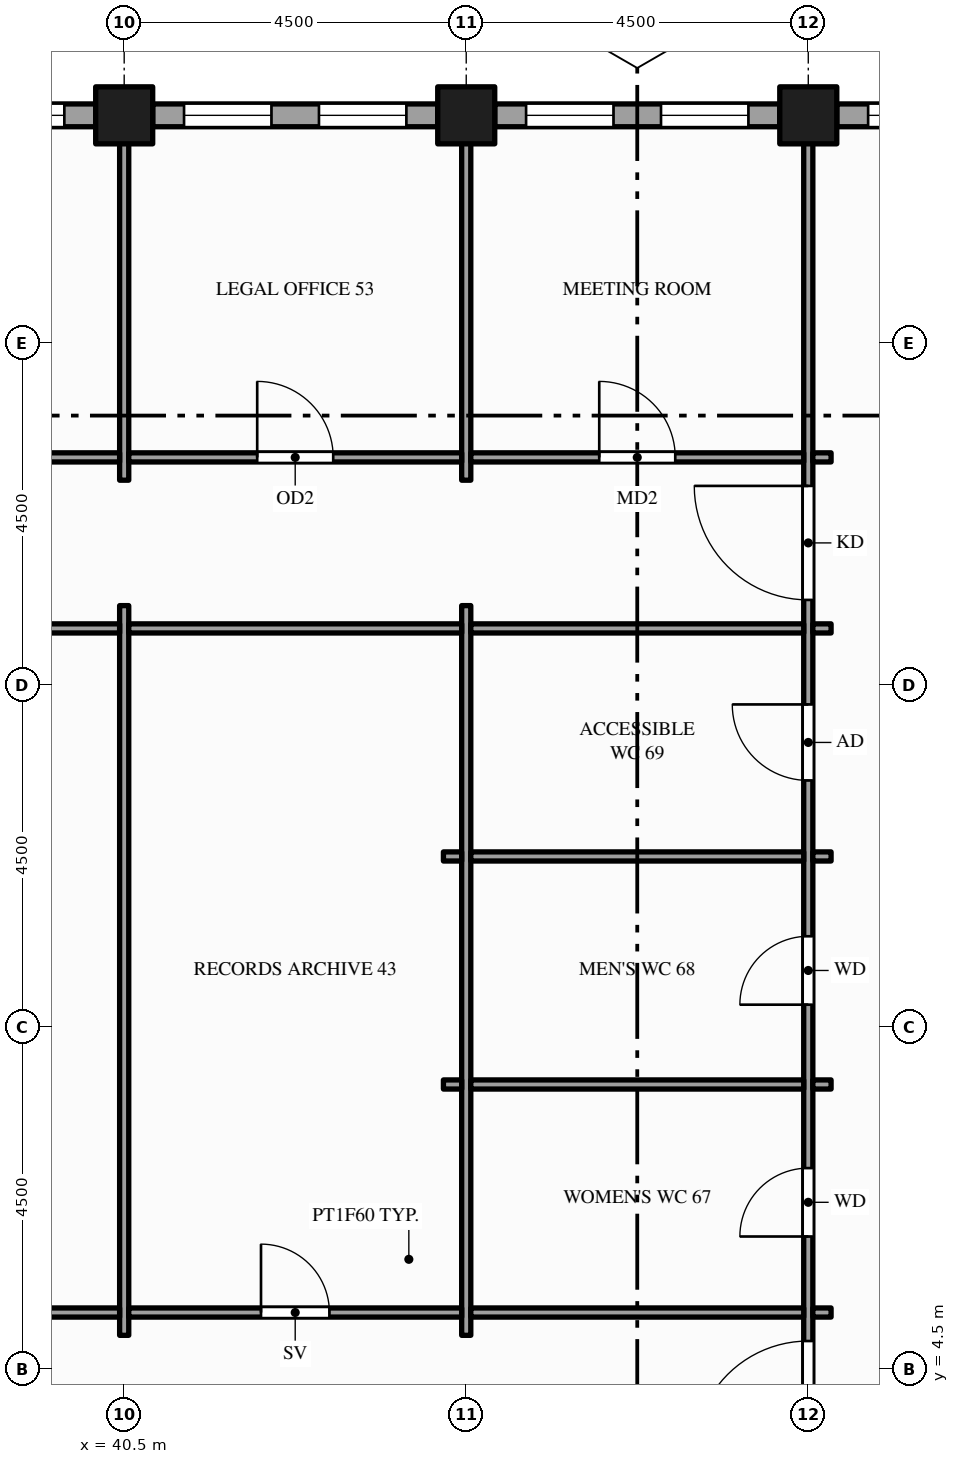
"""IFC4 building model, lengths in metres.
Left out: names, types, materials, properties, quantities, classifications, styles, units other than length and angle.
Written with IfcOpenShell. Run it as: python <this file> out.ifc"""

import sys

from ifc_helpers import new_model, si_unit, direction, frame, frame_2d, origin, origin_2d, place, context, subcontext, project, spatial, rectangle, hollow_rectangle, extrude, element, fill, save


model = new_model("IFC4")
c1 = context("Model", 3, precision=1e-05, world=origin(), true_north=direction((0.0, 1.0)))
c2 = subcontext(c1, "Body", "Model", "MODEL_VIEW")
j1 = project(units=[si_unit("LENGTHUNIT", "METRE"), si_unit("PLANEANGLEUNIT", "RADIAN")], contexts=[c1])
p1 = place(None, origin())
s1 = spatial("IfcSite", under=j1, at=p1, CompositionType="ELEMENT")
p2 = place(p1, origin())
s2 = spatial("IfcBuilding", under=s1, at=p2, CompositionType="ELEMENT")
p3 = place(p2, frame((0.0, 0.0, 195.0)))
s3 = spatial("IfcBuildingStorey", under=s2, at=p3, CompositionType="ELEMENT", Elevation=195.0)
for number, where, z_axis, x_axis in (
    (1, (40.5, 21.0, -0.15), (0.0, 0.0, 1.0), (1.0, 0.0, 0.0)),
    (2, (45.0, 21.0, -0.15), (0.0, 0.0, 1.0), (1.0, 0.0, 0.0)),
    (3, (49.5, 21.0, -0.15), (0.0, 0.0, 1.0), (1.0, 0.0, 0.0)),
):
    element("IfcColumn", number, at=place(p3, frame(where, z_axis=z_axis, x_axis=x_axis)), inside=s3, PredefinedType="COLUMN", context=c2, shape_type="SweptSolid", body=[
        extrude(hollow_rectangle(XDim=0.75, YDim=0.75, WallThickness=0.036, at=origin_2d()), origin(), (0.0, 0.0, 1.0), 4.0),
    ])
p4 = place(p3, frame((54.0, 21.0, 0.0), z_axis=(0.0, 0.0, 1.0), x_axis=(-1.0, 0.0, 0.0)))
e4 = element("IfcWall", 4, at=p4, inside=s3, PredefinedType="STANDARD", context=c2, shape_type="SweptSolid", body=[
    extrude(rectangle(XDim=4.125, YDim=0.3, at=frame_2d((2.062, 0.0))), origin(), (0.0, 0.0, 1.0), 2.87),
])
p5 = place(p4, frame((0.4, 0.0, 0.9)))
e5 = element("IfcOpeningElement", 5, at=p5, cuts=e4, PredefinedType="OPENING", context=c2, shape_type="SweptSolid", body=[
    extrude(rectangle(XDim=1.55, YDim=1.75, at=frame_2d((0.775, 0.875))), frame((0.0, 0.16, 0.0), z_axis=(0.0, -1.0, 0.0), x_axis=(1.0, 0.0, 0.0)), (0.0, 0.0, 1.0), 0.32),
])
p6 = place(p4, frame((2.562, 0.0, 0.9)))
e6 = element("IfcOpeningElement", 6, at=p6, cuts=e4, PredefinedType="OPENING", context=c2, shape_type="SweptSolid", body=[
    extrude(rectangle(XDim=1.15, YDim=1.75, at=frame_2d((0.575, 0.875))), frame((0.0, 0.16, 0.0), z_axis=(0.0, -1.0, 0.0), x_axis=(1.0, 0.0, 0.0)), (0.0, 0.0, 1.0), 0.32),
])
p7 = place(p3, frame((49.125, 21.0, 0.0), z_axis=(0.0, 0.0, 1.0), x_axis=(-1.0, 0.0, 0.0)))
e7 = element("IfcWall", 7, at=p7, inside=s3, PredefinedType="STANDARD", context=c2, shape_type="SweptSolid", body=[
    extrude(rectangle(XDim=3.75, YDim=0.3, at=frame_2d((1.875, 0.0))), origin(), (0.0, 0.0, 1.0), 2.87),
])
p8 = place(p7, frame((0.413, 0.0, 0.9)))
e8 = element("IfcOpeningElement", 8, at=p8, cuts=e7, PredefinedType="OPENING", context=c2, shape_type="SweptSolid", body=[
    extrude(rectangle(XDim=1.15, YDim=1.75, at=frame_2d((0.575, 0.875))), frame((0.0, 0.16, 0.0), z_axis=(0.0, -1.0, 0.0), x_axis=(1.0, 0.0, 0.0)), (0.0, 0.0, 1.0), 0.32),
])
p9 = place(p7, frame((2.188, 0.0, 0.9)))
e9 = element("IfcOpeningElement", 9, at=p9, cuts=e7, PredefinedType="OPENING", context=c2, shape_type="SweptSolid", body=[
    extrude(rectangle(XDim=1.15, YDim=1.75, at=frame_2d((0.575, 0.875))), frame((0.0, 0.16, 0.0), z_axis=(0.0, -1.0, 0.0), x_axis=(1.0, 0.0, 0.0)), (0.0, 0.0, 1.0), 0.32),
])
p10 = place(p3, frame((44.625, 21.0, 0.0), z_axis=(0.0, 0.0, 1.0), x_axis=(-1.0, 0.0, 0.0)))
e10 = element("IfcWall", 10, at=p10, inside=s3, PredefinedType="STANDARD", context=c2, shape_type="SweptSolid", body=[
    extrude(rectangle(XDim=3.75, YDim=0.3, at=frame_2d((1.875, 0.0))), origin(), (0.0, 0.0, 1.0), 2.87),
])
p11 = place(p10, frame((0.413, 0.0, 0.9)))
e11 = element("IfcOpeningElement", 11, at=p11, cuts=e10, PredefinedType="OPENING", context=c2, shape_type="SweptSolid", body=[
    extrude(rectangle(XDim=1.15, YDim=1.75, at=frame_2d((0.575, 0.875))), frame((0.0, 0.16, 0.0), z_axis=(0.0, -1.0, 0.0), x_axis=(1.0, 0.0, 0.0)), (0.0, 0.0, 1.0), 0.32),
])
p12 = place(p10, frame((2.188, 0.0, 0.9)))
e12 = element("IfcOpeningElement", 12, at=p12, cuts=e10, PredefinedType="OPENING", context=c2, shape_type="SweptSolid", body=[
    extrude(rectangle(XDim=1.15, YDim=1.75, at=frame_2d((0.575, 0.875))), frame((0.0, 0.16, 0.0), z_axis=(0.0, -1.0, 0.0), x_axis=(1.0, 0.0, 0.0)), (0.0, 0.0, 1.0), 0.32),
])
p13 = place(p3, frame((40.125, 21.0, 0.0), z_axis=(0.0, 0.0, 1.0), x_axis=(-1.0, 0.0, 0.0)))
e13 = element("IfcWall", 13, at=p13, inside=s3, PredefinedType="STANDARD", context=c2, shape_type="SweptSolid", body=[
    extrude(rectangle(XDim=3.75, YDim=0.3, at=frame_2d((1.875, 0.0))), origin(), (0.0, 0.0, 1.0), 2.87),
])
p14 = place(p13, frame((0.413, 0.0, 0.9)))
e14 = element("IfcOpeningElement", 14, at=p14, cuts=e13, PredefinedType="OPENING", context=c2, shape_type="SweptSolid", body=[
    extrude(rectangle(XDim=1.15, YDim=1.75, at=frame_2d((0.575, 0.875))), frame((0.0, 0.16, 0.0), z_axis=(0.0, -1.0, 0.0), x_axis=(1.0, 0.0, 0.0)), (0.0, 0.0, 1.0), 0.32),
])
p15 = place(p13, frame((2.188, 0.0, 0.9)))
e15 = element("IfcOpeningElement", 15, at=p15, cuts=e13, PredefinedType="OPENING", context=c2, shape_type="SweptSolid", body=[
    extrude(rectangle(XDim=1.15, YDim=1.75, at=frame_2d((0.575, 0.875))), frame((0.0, 0.16, 0.0), z_axis=(0.0, -1.0, 0.0), x_axis=(1.0, 0.0, 0.0)), (0.0, 0.0, 1.0), 0.32),
])
p16 = place(p3, frame((40.5, 4.95, 0.0), z_axis=(0.0, 0.0, 1.0), x_axis=(0.0, 1.0, 0.0)))
e16 = element("IfcWall", 16, at=p16, inside=s3, PredefinedType="PARTITIONING", context=c2, shape_type="SweptSolid", body=[
    extrude(rectangle(XDim=9.6, YDim=0.12, at=frame_2d((4.8, 0.0))), origin(), (0.0, 0.0, 1.0), 2.87),
])
p17 = place(p3, frame((40.5, 16.2, 0.0), z_axis=(0.0, 0.0, 1.0), x_axis=(0.0, 1.0, 0.0)))
e17 = element("IfcWall", 17, at=p17, inside=s3, PredefinedType="PARTITIONING", context=c2, shape_type="SweptSolid", body=[
    extrude(rectangle(XDim=4.65, YDim=0.12, at=frame_2d((2.325, 0.0))), origin(), (0.0, 0.0, 1.0), 2.87),
])
p18 = place(p3, frame((45.0, 4.95, 0.0), z_axis=(0.0, 0.0, 1.0), x_axis=(0.0, 1.0, 0.0)))
e18 = element("IfcWall", 18, at=p18, inside=s3, PredefinedType="PARTITIONING", context=c2, shape_type="SweptSolid", body=[
    extrude(rectangle(XDim=9.6, YDim=0.12, at=frame_2d((4.8, 0.0))), origin(), (0.0, 0.0, 1.0), 2.87),
])
p19 = place(p3, frame((45.0, 16.2, 0.0), z_axis=(0.0, 0.0, 1.0), x_axis=(0.0, 1.0, 0.0)))
e19 = element("IfcWall", 19, at=p19, inside=s3, PredefinedType="PARTITIONING", context=c2, shape_type="SweptSolid", body=[
    extrude(rectangle(XDim=4.65, YDim=0.12, at=frame_2d((2.325, 0.0))), origin(), (0.0, 0.0, 1.0), 2.87),
])
p20 = place(p3, frame((49.5, -1.35, 0.0), z_axis=(0.0, 0.0, 1.0), x_axis=(0.0, 1.0, 0.0)))
e20 = element("IfcWall", 20, at=p20, inside=s3, PredefinedType="PARTITIONING", context=c2, shape_type="SweptSolid", body=[
    extrude(rectangle(XDim=22.2, YDim=0.12, at=frame_2d((11.1, 0.0))), origin(), (0.0, 0.0, 1.0), 2.87),
])
p21 = place(p20, frame((4.725, 0.0, 0.0)))
e21 = element("IfcOpeningElement", 21, at=p21, cuts=e20, PredefinedType="OPENING", context=c2, shape_type="SweptSolid", body=[
    extrude(rectangle(XDim=1.5, YDim=2.1, at=frame_2d((0.75, 1.05))), frame((0.0, 0.07, 0.0), z_axis=(0.0, -1.0, 0.0), x_axis=(1.0, 0.0, 0.0)), (0.0, 0.0, 1.0), 0.14),
])
p22 = place(p20, frame((15.975, 0.0, 0.0)))
e22 = element("IfcOpeningElement", 22, at=p22, cuts=e20, PredefinedType="OPENING", context=c2, shape_type="SweptSolid", body=[
    extrude(rectangle(XDim=1.5, YDim=2.1, at=frame_2d((0.75, 1.05))), frame((0.0, 0.07, 0.0), z_axis=(0.0, -1.0, 0.0), x_axis=(1.0, 0.0, 0.0)), (0.0, 0.0, 1.0), 0.14),
])
p23 = place(p20, frame((7.6, 0.0, 0.0)))
e23 = element("IfcOpeningElement", 23, at=p23, cuts=e20, PredefinedType="OPENING", context=c2, shape_type="SweptSolid", body=[
    extrude(rectangle(XDim=0.9, YDim=2.1, at=frame_2d((0.45, 1.05))), frame((0.0, 0.07, 0.0), z_axis=(0.0, -1.0, 0.0), x_axis=(1.0, 0.0, 0.0)), (0.0, 0.0, 1.0), 0.14),
])
p24 = place(p20, frame((10.65, 0.0, 0.0)))
e24 = element("IfcOpeningElement", 24, at=p24, cuts=e20, PredefinedType="OPENING", context=c2, shape_type="SweptSolid", body=[
    extrude(rectangle(XDim=0.9, YDim=2.1, at=frame_2d((0.45, 1.05))), frame((0.0, 0.07, 0.0), z_axis=(0.0, -1.0, 0.0), x_axis=(1.0, 0.0, 0.0)), (0.0, 0.0, 1.0), 0.14),
])
p25 = place(p20, frame((13.6, 0.0, 0.0)))
e25 = element("IfcOpeningElement", 25, at=p25, cuts=e20, PredefinedType="OPENING", context=c2, shape_type="SweptSolid", body=[
    extrude(rectangle(XDim=1.0, YDim=2.1, at=frame_2d((0.5, 1.05))), frame((0.0, 0.07, 0.0), z_axis=(0.0, -1.0, 0.0), x_axis=(1.0, 0.0, 0.0)), (0.0, 0.0, 1.0), 0.14),
])
p26 = place(p3, frame((36.06, 5.25, 0.0), z_axis=(0.0, 0.0, 1.0), x_axis=(1.0, 0.0, 0.0)))
e26 = element("IfcWall", 26, at=p26, inside=s3, PredefinedType="PARTITIONING", context=c2, shape_type="SweptSolid", body=[
    extrude(rectangle(XDim=4.38, YDim=0.12, at=frame_2d((2.19, 0.0))), origin(), (0.0, 0.0, 1.0), 2.87),
])
p27 = place(p3, frame((40.56, 5.25, 0.0), z_axis=(0.0, 0.0, 1.0), x_axis=(1.0, 0.0, 0.0)))
e27 = element("IfcWall", 27, at=p27, inside=s3, PredefinedType="PARTITIONING", context=c2, shape_type="SweptSolid", body=[
    extrude(rectangle(XDim=4.38, YDim=0.12, at=frame_2d((2.19, 0.0))), origin(), (0.0, 0.0, 1.0), 2.87),
])
p28 = place(p27, frame((1.74, 0.0, 0.0)))
e28 = element("IfcOpeningElement", 28, at=p28, cuts=e27, PredefinedType="OPENING", context=c2, shape_type="SweptSolid", body=[
    extrude(rectangle(XDim=0.9, YDim=2.1, at=frame_2d((0.45, 1.05))), frame((0.0, 0.07, 0.0), z_axis=(0.0, -1.0, 0.0), x_axis=(1.0, 0.0, 0.0)), (0.0, 0.0, 1.0), 0.14),
])
p29 = place(p3, frame((45.06, 5.25, 0.0), z_axis=(0.0, 0.0, 1.0), x_axis=(1.0, 0.0, 0.0)))
e29 = element("IfcWall", 29, at=p29, inside=s3, PredefinedType="PARTITIONING", context=c2, shape_type="SweptSolid", body=[
    extrude(rectangle(XDim=4.38, YDim=0.12, at=frame_2d((2.19, 0.0))), origin(), (0.0, 0.0, 1.0), 2.87),
])
for number, where, z_axis, x_axis in (
    (30, (49.56, 5.25, 0.0), (0.0, 0.0, 1.0), (1.0, 0.0, 0.0)),
    (31, (44.7, 8.25, 0.0), (0.0, 0.0, 1.0), (1.0, 0.0, 0.0)),
):
    element("IfcWall", number, at=place(p3, frame(where, z_axis=z_axis, x_axis=x_axis)), inside=s3, PredefinedType="PARTITIONING", context=c2, shape_type="SweptSolid", body=[
        extrude(rectangle(XDim=0.24, YDim=0.12, at=frame_2d((0.12, 0.0))), origin(), (0.0, 0.0, 1.0), 2.87),
    ])
p30 = place(p3, frame((45.06, 8.25, 0.0), z_axis=(0.0, 0.0, 1.0), x_axis=(1.0, 0.0, 0.0)))
e32 = element("IfcWall", 32, at=p30, inside=s3, PredefinedType="PARTITIONING", context=c2, shape_type="SweptSolid", body=[
    extrude(rectangle(XDim=4.38, YDim=0.12, at=frame_2d((2.19, 0.0))), origin(), (0.0, 0.0, 1.0), 2.87),
])
for number, where, z_axis, x_axis in (
    (33, (49.56, 8.25, 0.0), (0.0, 0.0, 1.0), (1.0, 0.0, 0.0)),
    (34, (44.7, 11.25, 0.0), (0.0, 0.0, 1.0), (1.0, 0.0, 0.0)),
):
    element("IfcWall", number, at=place(p3, frame(where, z_axis=z_axis, x_axis=x_axis)), inside=s3, PredefinedType="PARTITIONING", context=c2, shape_type="SweptSolid", body=[
        extrude(rectangle(XDim=0.24, YDim=0.12, at=frame_2d((0.12, 0.0))), origin(), (0.0, 0.0, 1.0), 2.87),
    ])
p31 = place(p3, frame((45.06, 11.25, 0.0), z_axis=(0.0, 0.0, 1.0), x_axis=(1.0, 0.0, 0.0)))
e35 = element("IfcWall", 35, at=p31, inside=s3, PredefinedType="PARTITIONING", context=c2, shape_type="SweptSolid", body=[
    extrude(rectangle(XDim=4.38, YDim=0.12, at=frame_2d((2.19, 0.0))), origin(), (0.0, 0.0, 1.0), 2.87),
])
p32 = place(p3, frame((49.56, 11.25, 0.0), z_axis=(0.0, 0.0, 1.0), x_axis=(1.0, 0.0, 0.0)))
e36 = element("IfcWall", 36, at=p32, inside=s3, PredefinedType="PARTITIONING", context=c2, shape_type="SweptSolid", body=[
    extrude(rectangle(XDim=0.24, YDim=0.12, at=frame_2d((0.12, 0.0))), origin(), (0.0, 0.0, 1.0), 2.87),
])
p33 = place(p3, frame((36.06, 14.25, 0.0), z_axis=(0.0, 0.0, 1.0), x_axis=(1.0, 0.0, 0.0)))
e37 = element("IfcWall", 37, at=p33, inside=s3, PredefinedType="PARTITIONING", context=c2, shape_type="SweptSolid", body=[
    extrude(rectangle(XDim=4.38, YDim=0.12, at=frame_2d((2.19, 0.0))), origin(), (0.0, 0.0, 1.0), 2.87),
])
p34 = place(p33, frame((1.59, 0.0, 0.0)))
e38 = element("IfcOpeningElement", 38, at=p34, cuts=e37, PredefinedType="OPENING", context=c2, shape_type="SweptSolid", body=[
    extrude(rectangle(XDim=1.2, YDim=2.1, at=frame_2d((0.6, 1.05))), frame((0.0, 0.07, 0.0), z_axis=(0.0, -1.0, 0.0), x_axis=(1.0, 0.0, 0.0)), (0.0, 0.0, 1.0), 0.14),
])
for number, where, z_axis, x_axis in (
    (39, (40.56, 14.25, 0.0), (0.0, 0.0, 1.0), (1.0, 0.0, 0.0)),
    (40, (45.06, 14.25, 0.0), (0.0, 0.0, 1.0), (1.0, 0.0, 0.0)),
):
    element("IfcWall", number, at=place(p3, frame(where, z_axis=z_axis, x_axis=x_axis)), inside=s3, PredefinedType="PARTITIONING", context=c2, shape_type="SweptSolid", body=[
        extrude(rectangle(XDim=4.38, YDim=0.12, at=frame_2d((2.19, 0.0))), origin(), (0.0, 0.0, 1.0), 2.87),
    ])
p35 = place(p3, frame((49.56, 14.25, 0.0), z_axis=(0.0, 0.0, 1.0), x_axis=(1.0, 0.0, 0.0)))
e41 = element("IfcWall", 41, at=p35, inside=s3, PredefinedType="PARTITIONING", context=c2, shape_type="SweptSolid", body=[
    extrude(rectangle(XDim=0.24, YDim=0.12, at=frame_2d((0.12, 0.0))), origin(), (0.0, 0.0, 1.0), 2.87),
])
p36 = place(p3, frame((33.81, 16.5, 0.0), z_axis=(0.0, 0.0, 1.0), x_axis=(1.0, 0.0, 0.0)))
e42 = element("IfcWall", 42, at=p36, inside=s3, PredefinedType="PARTITIONING", context=c2, shape_type="SweptSolid", body=[
    extrude(rectangle(XDim=6.63, YDim=0.12, at=frame_2d((3.315, 0.0))), origin(), (0.0, 0.0, 1.0), 2.87),
])
p37 = place(p36, frame((2.815, 0.0, 0.0)))
e43 = element("IfcOpeningElement", 43, at=p37, cuts=e42, PredefinedType="OPENING", context=c2, shape_type="SweptSolid", body=[
    extrude(rectangle(XDim=1.0, YDim=2.1, at=frame_2d((0.5, 1.05))), frame((0.0, 0.07, 0.0), z_axis=(0.0, -1.0, 0.0), x_axis=(1.0, 0.0, 0.0)), (0.0, 0.0, 1.0), 0.14),
])
p38 = place(p3, frame((40.56, 16.5, 0.0), z_axis=(0.0, 0.0, 1.0), x_axis=(1.0, 0.0, 0.0)))
e44 = element("IfcWall", 44, at=p38, inside=s3, PredefinedType="PARTITIONING", context=c2, shape_type="SweptSolid", body=[
    extrude(rectangle(XDim=4.38, YDim=0.12, at=frame_2d((2.19, 0.0))), origin(), (0.0, 0.0, 1.0), 2.87),
])
p39 = place(p38, frame((1.69, 0.0, 0.0)))
e45 = element("IfcOpeningElement", 45, at=p39, cuts=e44, PredefinedType="OPENING", context=c2, shape_type="SweptSolid", body=[
    extrude(rectangle(XDim=1.0, YDim=2.1, at=frame_2d((0.5, 1.05))), frame((0.0, 0.07, 0.0), z_axis=(0.0, -1.0, 0.0), x_axis=(1.0, 0.0, 0.0)), (0.0, 0.0, 1.0), 0.14),
])
p40 = place(p3, frame((45.06, 16.5, 0.0), z_axis=(0.0, 0.0, 1.0), x_axis=(1.0, 0.0, 0.0)))
e46 = element("IfcWall", 46, at=p40, inside=s3, PredefinedType="PARTITIONING", context=c2, shape_type="SweptSolid", body=[
    extrude(rectangle(XDim=4.38, YDim=0.12, at=frame_2d((2.19, 0.0))), origin(), (0.0, 0.0, 1.0), 2.87),
])
p41 = place(p40, frame((1.69, 0.0, 0.0)))
e47 = element("IfcOpeningElement", 47, at=p41, cuts=e46, PredefinedType="OPENING", context=c2, shape_type="SweptSolid", body=[
    extrude(rectangle(XDim=1.0, YDim=2.1, at=frame_2d((0.5, 1.05))), frame((0.0, 0.07, 0.0), z_axis=(0.0, -1.0, 0.0), x_axis=(1.0, 0.0, 0.0)), (0.0, 0.0, 1.0), 0.14),
])
p42 = place(p3, frame((49.56, 16.5, 0.0), z_axis=(0.0, 0.0, 1.0), x_axis=(1.0, 0.0, 0.0)))
e48 = element("IfcWall", 48, at=p42, inside=s3, PredefinedType="PARTITIONING", context=c2, shape_type="SweptSolid", body=[
    extrude(rectangle(XDim=0.24, YDim=0.12, at=frame_2d((0.12, 0.0))), origin(), (0.0, 0.0, 1.0), 2.87),
])
p43 = place(p6, origin())
e49 = element("IfcWindow", 49, at=p43, inside=s3, PartitioningType="SINGLE_PANEL", PredefinedType="WINDOW", context=c2, shape_type="SweptSolid", body=[
    extrude(rectangle(XDim=1.15, YDim=1.75, at=frame_2d((0.575, 0.875))), frame((0.0, 0.03, 0.0), z_axis=(0.0, -1.0, 0.0), x_axis=(1.0, 0.0, 0.0)), (0.0, 0.0, 1.0), 0.06),
])
fill(e6, e49)
p44 = place(p8, origin())
e50 = element("IfcWindow", 50, at=p44, inside=s3, PartitioningType="SINGLE_PANEL", PredefinedType="WINDOW", context=c2, shape_type="SweptSolid", body=[
    extrude(rectangle(XDim=1.15, YDim=1.75, at=frame_2d((0.575, 0.875))), frame((0.0, 0.03, 0.0), z_axis=(0.0, -1.0, 0.0), x_axis=(1.0, 0.0, 0.0)), (0.0, 0.0, 1.0), 0.06),
])
fill(e8, e50)
p45 = place(p9, origin())
e51 = element("IfcWindow", 51, at=p45, inside=s3, PartitioningType="SINGLE_PANEL", PredefinedType="WINDOW", context=c2, shape_type="SweptSolid", body=[
    extrude(rectangle(XDim=1.15, YDim=1.75, at=frame_2d((0.575, 0.875))), frame((0.0, 0.03, 0.0), z_axis=(0.0, -1.0, 0.0), x_axis=(1.0, 0.0, 0.0)), (0.0, 0.0, 1.0), 0.06),
])
fill(e9, e51)
p46 = place(p11, origin())
e52 = element("IfcWindow", 52, at=p46, inside=s3, PartitioningType="SINGLE_PANEL", PredefinedType="WINDOW", context=c2, shape_type="SweptSolid", body=[
    extrude(rectangle(XDim=1.15, YDim=1.75, at=frame_2d((0.575, 0.875))), frame((0.0, 0.03, 0.0), z_axis=(0.0, -1.0, 0.0), x_axis=(1.0, 0.0, 0.0)), (0.0, 0.0, 1.0), 0.06),
])
fill(e11, e52)
p47 = place(p12, origin())
e53 = element("IfcWindow", 53, at=p47, inside=s3, PartitioningType="SINGLE_PANEL", PredefinedType="WINDOW", context=c2, shape_type="SweptSolid", body=[
    extrude(rectangle(XDim=1.15, YDim=1.75, at=frame_2d((0.575, 0.875))), frame((0.0, 0.03, 0.0), z_axis=(0.0, -1.0, 0.0), x_axis=(1.0, 0.0, 0.0)), (0.0, 0.0, 1.0), 0.06),
])
fill(e12, e53)
p48 = place(p14, origin())
e54 = element("IfcWindow", 54, at=p48, inside=s3, PartitioningType="SINGLE_PANEL", PredefinedType="WINDOW", context=c2, shape_type="SweptSolid", body=[
    extrude(rectangle(XDim=1.15, YDim=1.75, at=frame_2d((0.575, 0.875))), frame((0.0, 0.03, 0.0), z_axis=(0.0, -1.0, 0.0), x_axis=(1.0, 0.0, 0.0)), (0.0, 0.0, 1.0), 0.06),
])
fill(e14, e54)
p49 = place(p21, origin())
e55 = element("IfcDoor", 55, at=p49, inside=s3, OperationType="SINGLE_SWING_LEFT", PredefinedType="DOOR", context=c2, shape_type="SweptSolid", body=[
    extrude(rectangle(XDim=1.5, YDim=2.1, at=frame_2d((0.75, 1.05))), frame((0.0, 0.025, 0.0), z_axis=(0.0, -1.0, 0.0), x_axis=(1.0, 0.0, 0.0)), (0.0, 0.0, 1.0), 0.05),
])
fill(e21, e55)
p50 = place(p22, origin())
e56 = element("IfcDoor", 56, at=p50, inside=s3, OperationType="SINGLE_SWING_RIGHT", PredefinedType="DOOR", context=c2, shape_type="SweptSolid", body=[
    extrude(rectangle(XDim=1.5, YDim=2.1, at=frame_2d((0.75, 1.05))), frame((0.0, 0.025, 0.0), z_axis=(0.0, -1.0, 0.0), x_axis=(1.0, 0.0, 0.0)), (0.0, 0.0, 1.0), 0.05),
])
fill(e22, e56)
p51 = place(p28, origin())
e57 = element("IfcDoor", 57, at=p51, inside=s3, OperationType="SINGLE_SWING_LEFT", PredefinedType="DOOR", context=c2, shape_type="SweptSolid", body=[
    extrude(rectangle(XDim=0.9, YDim=2.1, at=frame_2d((0.45, 1.05))), frame((0.0, 0.025, 0.0), z_axis=(0.0, -1.0, 0.0), x_axis=(1.0, 0.0, 0.0)), (0.0, 0.0, 1.0), 0.05),
])
fill(e28, e57)
p52 = place(p23, origin())
e58 = element("IfcDoor", 58, at=p52, inside=s3, OperationType="SINGLE_SWING_LEFT", PredefinedType="DOOR", context=c2, shape_type="SweptSolid", body=[
    extrude(rectangle(XDim=0.9, YDim=2.1, at=frame_2d((0.45, 1.05))), frame((0.0, 0.025, 0.0), z_axis=(0.0, -1.0, 0.0), x_axis=(1.0, 0.0, 0.0)), (0.0, 0.0, 1.0), 0.05),
])
fill(e23, e58)
p53 = place(p24, origin())
e59 = element("IfcDoor", 59, at=p53, inside=s3, OperationType="SINGLE_SWING_LEFT", PredefinedType="DOOR", context=c2, shape_type="SweptSolid", body=[
    extrude(rectangle(XDim=0.9, YDim=2.1, at=frame_2d((0.45, 1.05))), frame((0.0, 0.025, 0.0), z_axis=(0.0, -1.0, 0.0), x_axis=(1.0, 0.0, 0.0)), (0.0, 0.0, 1.0), 0.05),
])
fill(e24, e59)
p54 = place(p25, origin())
e60 = element("IfcDoor", 60, at=p54, inside=s3, OperationType="SINGLE_SWING_RIGHT", PredefinedType="DOOR", context=c2, shape_type="SweptSolid", body=[
    extrude(rectangle(XDim=1.0, YDim=2.1, at=frame_2d((0.5, 1.05))), frame((0.0, 0.025, 0.0), z_axis=(0.0, -1.0, 0.0), x_axis=(1.0, 0.0, 0.0)), (0.0, 0.0, 1.0), 0.05),
])
fill(e25, e60)
p55 = place(p39, origin())
e61 = element("IfcDoor", 61, at=p55, inside=s3, OperationType="SINGLE_SWING_LEFT", PredefinedType="DOOR", context=c2, shape_type="SweptSolid", body=[
    extrude(rectangle(XDim=1.0, YDim=2.1, at=frame_2d((0.5, 1.05))), frame((0.0, 0.025, 0.0), z_axis=(0.0, -1.0, 0.0), x_axis=(1.0, 0.0, 0.0)), (0.0, 0.0, 1.0), 0.05),
])
fill(e45, e61)
p56 = place(p41, origin())
e62 = element("IfcDoor", 62, at=p56, inside=s3, OperationType="SINGLE_SWING_LEFT", PredefinedType="DOOR", context=c2, shape_type="SweptSolid", body=[
    extrude(rectangle(XDim=1.0, YDim=2.1, at=frame_2d((0.5, 1.05))), frame((0.0, 0.025, 0.0), z_axis=(0.0, -1.0, 0.0), x_axis=(1.0, 0.0, 0.0)), (0.0, 0.0, 1.0), 0.05),
])
fill(e47, e62)
save(model, sys.argv[1])
